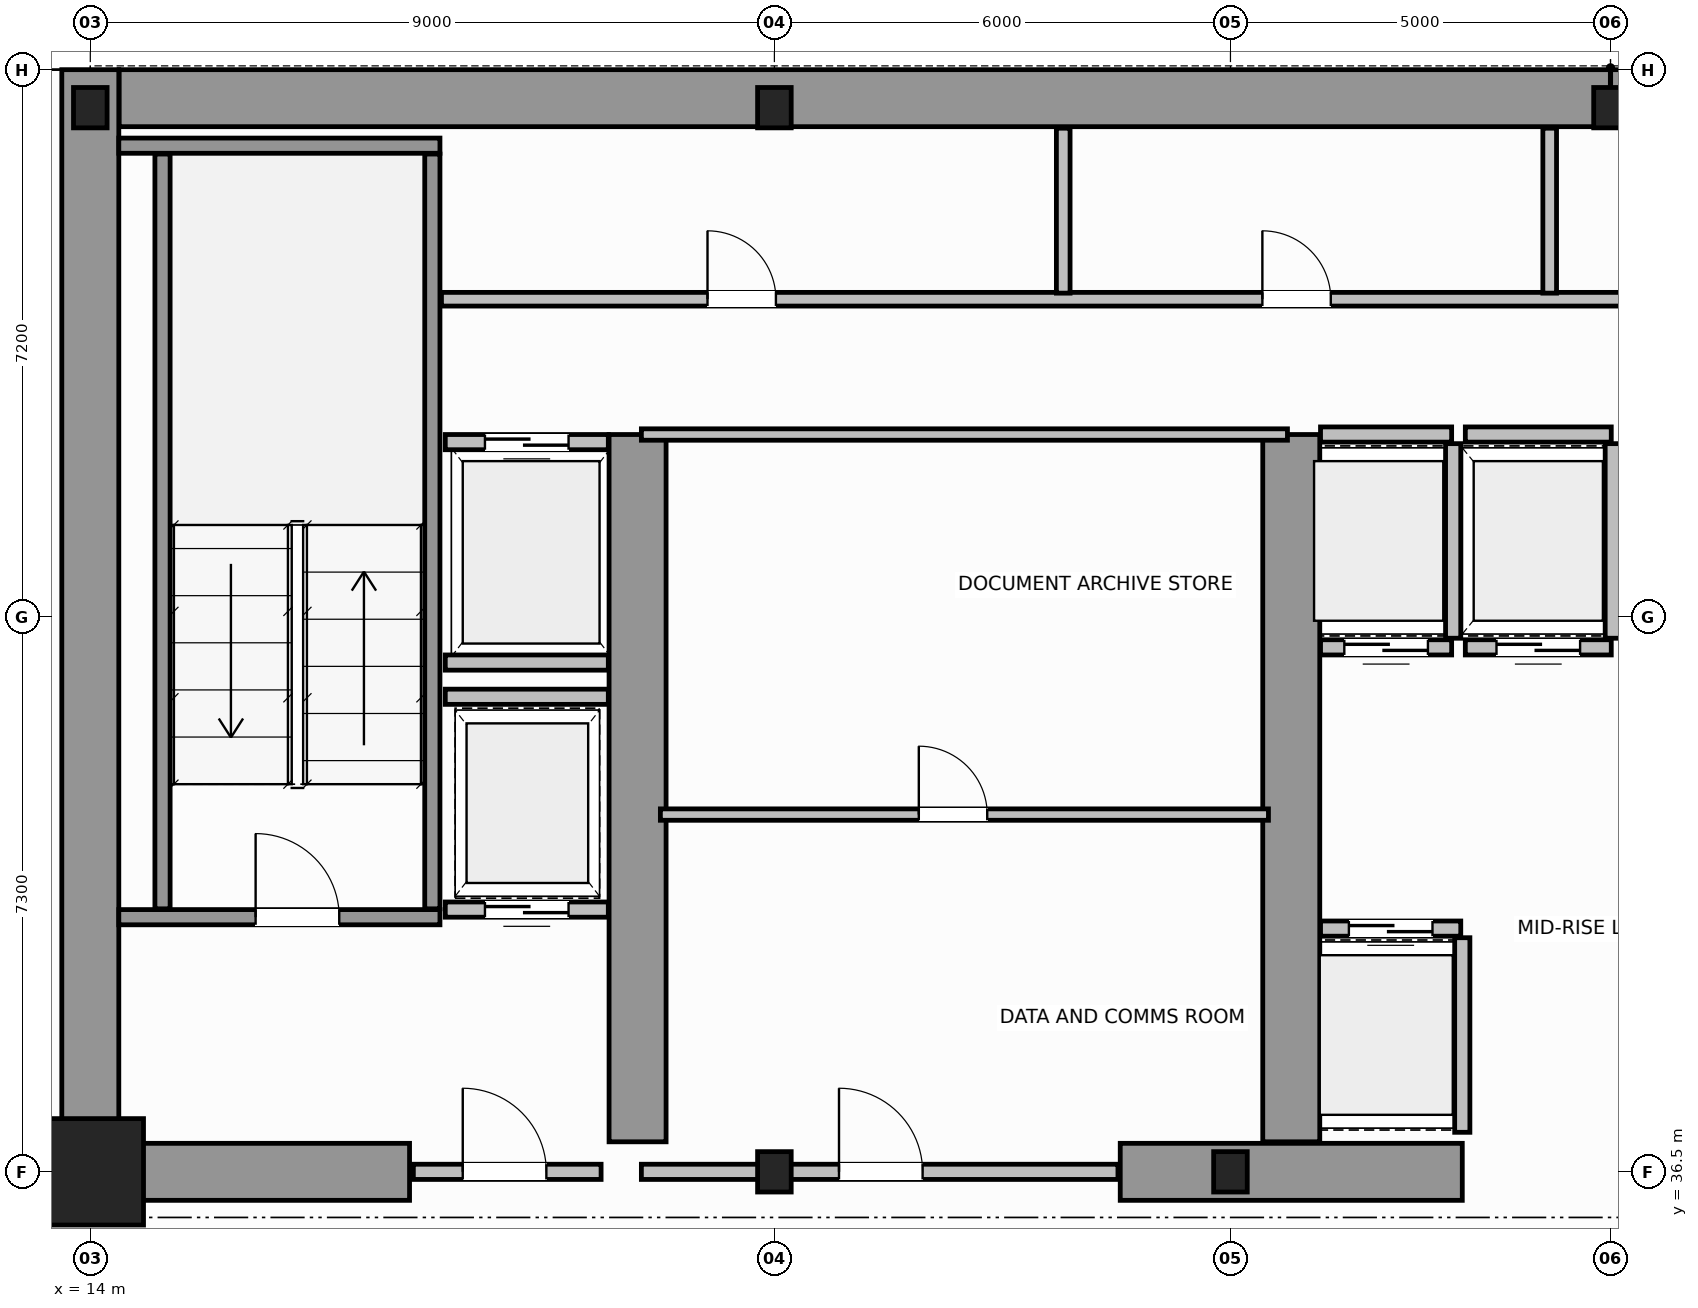
"""IFC4 building model, lengths in metres.
Left out: names, types, materials, properties, quantities, classifications, styles, units other than length and angle.
Written with IfcOpenShell. Run it as: python <this file> out.ifc"""

import sys

from ifc_helpers import new_model, si_unit, direction, frame, frame_2d, origin, origin_2d, place, context, subcontext, project, spatial, rectangle, i_section, extrude, source, transform, mapped, element, fill, save


model = new_model("IFC4")
c1 = context("Model", 3, precision=1e-05, world=origin(), true_north=direction((0.0, 1.0)))
c2 = subcontext(c1, "Body", "Model", "MODEL_VIEW")
j1 = project(units=[si_unit("LENGTHUNIT", "METRE"), si_unit("PLANEANGLEUNIT", "RADIAN")], contexts=[c1])
p1 = place(None, origin())
s1 = spatial("IfcSite", under=j1, at=p1, CompositionType="ELEMENT")
p2 = place(p1, origin())
s2 = spatial("IfcBuilding", under=s1, at=p2, CompositionType="ELEMENT")
p3 = place(p2, frame((0.0, 0.0, 118.6)))
s3 = spatial("IfcBuildingStorey", under=s2, at=p3, CompositionType="ELEMENT", Elevation=118.6)
m1 = source(origin(), c2, "Body", "SweptSolid", [
    extrude(rectangle(XDim=1.4, YDim=1.4, at=origin_2d()), origin(), (0.0, 0.0, 1.0), 3.8),
])
p4 = place(p3, frame((14.0, 36.5, 0.0), z_axis=(0.0, 0.0, 1.0), x_axis=(1.0, 0.0, 0.0)))
e1 = element("IfcColumn", 1, at=p4, inside=s3, PredefinedType="COLUMN", context=c2, shape_type="MappedRepresentation", body=[
    mapped(m1, transform((0.0, 0.0, 0.0), scale=1.0)),
])
m2 = source(origin(), c2, "Body", "SweptSolid", [
    extrude(i_section(OverallWidth=0.442, OverallDepth=0.531, WebThickness=0.065, FlangeThickness=0.076, FilletRadius=0.015, at=origin_2d()), origin(), (0.0, 0.0, 1.0), 3.8),
])
for number, where, z_axis, x_axis in (
    (2, (23.0, 36.5, 0.0), (0.0, 0.0, 1.0), (1.0, 0.0, 0.0)),
    (3, (29.0, 36.5, 0.0), (0.0, 0.0, 1.0), (1.0, 0.0, 0.0)),
    (4, (14.0, 50.5, 0.0), (0.0, 0.0, 1.0), (1.0, 0.0, 0.0)),
    (5, (23.0, 50.5, 0.0), (0.0, 0.0, 1.0), (1.0, 0.0, 0.0)),
    (6, (34.0, 50.5, 0.0), (0.0, 0.0, 1.0), (1.0, 0.0, 0.0)),
):
    element("IfcColumn", number, at=place(p3, frame(where, z_axis=z_axis, x_axis=x_axis)), inside=s3, PredefinedType="COLUMN", context=c2, shape_type="MappedRepresentation", body=[
        mapped(m2, transform((0.0, 0.0, 0.0), scale=1.0)),
    ])
for number, where, z_axis, x_axis in (
    (7, (14.379, 50.625, 0.0), (0.0, 0.0, 1.0), (1.0, 0.0, 0.0)),
    (8, (34.002, 50.625, 0.0), (0.0, 0.0, 1.0), (1.0, 0.0, 0.0)),
):
    element("IfcWall", number, at=place(p3, frame(where, z_axis=z_axis, x_axis=x_axis)), inside=s3, PredefinedType="SHEAR", context=c2, shape_type="SweptSolid", body=[
        extrude(rectangle(XDim=19.619, YDim=0.75, at=frame_2d((9.81, 0.0))), origin(), (0.0, 0.0, 1.0), 3.8),
    ])
p5 = place(p3, frame((14.0, 36.5, 0.0), z_axis=(0.0, 0.0, 1.0), x_axis=(0.0, 1.0, 0.0)))
e9 = element("IfcWall", 9, at=p5, inside=s3, PredefinedType="SHEAR", context=c2, shape_type="SweptSolid", body=[
    extrude(rectangle(XDim=14.5, YDim=0.75, at=frame_2d((7.25, 0.0))), origin(), (0.0, 0.0, 1.0), 3.8),
])
p6 = place(p3, frame((14.395, 36.5, 0.0), z_axis=(0.0, 0.0, 1.0), x_axis=(1.0, 0.0, 0.0)))
e10 = element("IfcWall", 10, at=p6, inside=s3, PredefinedType="SHEAR", context=c2, shape_type="SweptSolid", body=[
    extrude(rectangle(XDim=3.805, YDim=0.75, at=frame_2d((1.902, 0.0))), origin(), (0.0, 0.0, 1.0), 2.38),
])
p7 = place(p3, frame((27.55, 36.5, 0.0), z_axis=(0.0, 0.0, 1.0), x_axis=(1.0, 0.0, 0.0)))
e11 = element("IfcWall", 11, at=p7, inside=s3, PredefinedType="SHEAR", context=c2, shape_type="SweptSolid", body=[
    extrude(rectangle(XDim=4.5, YDim=0.75, at=frame_2d((2.25, 0.0))), origin(), (0.0, 0.0, 1.0), 3.8),
])
for number, where, z_axis, x_axis in (
    (12, (21.2, 36.895, 0.0), (0.0, 0.0, 1.0), (0.0, 1.0, 0.0)),
    (13, (29.8, 36.895, 0.0), (0.0, 0.0, 1.0), (0.0, 1.0, 0.0)),
):
    element("IfcWall", number, at=place(p3, frame(where, z_axis=z_axis, x_axis=x_axis)), inside=s3, PredefinedType="SHEAR", context=c2, shape_type="SweptSolid", body=[
        extrude(rectangle(XDim=9.305, YDim=0.75, at=frame_2d((4.652, 0.0))), origin(), (0.0, 0.0, 1.0), 3.8),
    ])
p8 = place(p3, frame((14.375, 39.85, 0.0), z_axis=(0.0, 0.0, 1.0), x_axis=(1.0, 0.0, 0.0)))
e14 = element("IfcWall", 14, at=p8, inside=s3, PredefinedType="SOLIDWALL", context=c2, shape_type="SweptSolid", body=[
    extrude(rectangle(XDim=4.225, YDim=0.2, at=frame_2d((2.113, 0.0))), origin(), (0.0, 0.0, 1.0), 3.8),
])
p9 = place(p8, frame((1.8, 0.0, 0.0)))
e15 = element("IfcOpeningElement", 15, at=p9, cuts=e14, PredefinedType="OPENING", context=c2, shape_type="SweptSolid", body=[
    extrude(rectangle(XDim=1.1, YDim=2.15, at=frame_2d((0.55, 1.075))), frame((0.0, 0.11, 0.0), z_axis=(0.0, -1.0, 0.0), x_axis=(1.0, 0.0, 0.0)), (0.0, 0.0, 1.0), 0.22),
])
p10 = place(p3, frame((14.375, 50.0, 0.0), z_axis=(0.0, 0.0, 1.0), x_axis=(1.0, 0.0, 0.0)))
e16 = element("IfcWall", 16, at=p10, inside=s3, PredefinedType="SOLIDWALL", context=c2, shape_type="SweptSolid", body=[
    extrude(rectangle(XDim=4.225, YDim=0.2, at=frame_2d((2.113, 0.0))), origin(), (0.0, 0.0, 1.0), 3.8),
])
for number, where, z_axis, x_axis in (
    (17, (14.95, 39.96, 0.0), (0.0, 0.0, 1.0), (0.0, 1.0, 0.0)),
    (18, (18.5, 39.96, 0.0), (0.0, 0.0, 1.0), (0.0, 1.0, 0.0)),
):
    element("IfcWall", number, at=place(p3, frame(where, z_axis=z_axis, x_axis=x_axis)), inside=s3, PredefinedType="SOLIDWALL", context=c2, shape_type="SweptSolid", body=[
        extrude(rectangle(XDim=9.93, YDim=0.2, at=frame_2d((4.965, 0.0))), origin(), (0.0, 0.0, 1.0), 3.8),
    ])
p11 = place(p3, frame((18.25, 36.5, 0.0), z_axis=(0.0, 0.0, 1.0), x_axis=(1.0, 0.0, 0.0)))
e19 = element("IfcWall", 19, at=p11, inside=s3, PredefinedType="SOLIDWALL", context=c2, shape_type="SweptSolid", body=[
    extrude(rectangle(XDim=2.47, YDim=0.2, at=frame_2d((1.235, 0.0))), origin(), (0.0, 0.0, 1.0), 2.37),
])
p12 = place(p11, frame((0.65, 0.0, 0.0)))
e20 = element("IfcOpeningElement", 20, at=p12, cuts=e19, PredefinedType="OPENING", context=c2, shape_type="SweptSolid", body=[
    extrude(rectangle(XDim=1.1, YDim=2.15, at=frame_2d((0.55, 1.075))), frame((0.0, 0.11, 0.0), z_axis=(0.0, -1.0, 0.0), x_axis=(1.0, 0.0, 0.0)), (0.0, 0.0, 1.0), 0.22),
])
p13 = place(p3, frame((30.185, 39.7, 0.0), z_axis=(0.0, 0.0, 1.0), x_axis=(1.0, 0.0, 0.0)))
e21 = element("IfcWall", 21, at=p13, inside=s3, PredefinedType="SOLIDWALL", context=c2, shape_type="SweptSolid", body=[
    extrude(rectangle(XDim=1.845, YDim=0.2, at=frame_2d((0.922, 0.0))), origin(), (0.0, 0.0, 1.0), 3.58),
])
p14 = place(p13, frame((0.373, 0.0, 0.0)))
e22 = element("IfcOpeningElement", 22, at=p14, cuts=e21, PredefinedType="OPENING", context=c2, shape_type="SweptSolid", body=[
    extrude(rectangle(XDim=1.1, YDim=2.15, at=frame_2d((0.55, 1.075))), frame((0.0, 0.11, 0.0), z_axis=(0.0, -1.0, 0.0), x_axis=(1.0, 0.0, 0.0)), (0.0, 0.0, 1.0), 0.22),
])
p15 = place(p3, frame((32.05, 37.02, 0.0), z_axis=(0.0, 0.0, 1.0), x_axis=(0.0, 1.0, 0.0)))
e23 = element("IfcWall", 23, at=p15, inside=s3, PredefinedType="SOLIDWALL", context=c2, shape_type="SweptSolid", body=[
    extrude(rectangle(XDim=2.56, YDim=0.2, at=frame_2d((1.28, 0.0))), origin(), (0.0, 0.0, 1.0), 3.58),
])
p16 = place(p3, frame((30.185, 43.4, 0.0), z_axis=(0.0, 0.0, 1.0), x_axis=(1.0, 0.0, 0.0)))
e24 = element("IfcWall", 24, at=p16, inside=s3, PredefinedType="SOLIDWALL", context=c2, shape_type="SweptSolid", body=[
    extrude(rectangle(XDim=1.725, YDim=0.2, at=frame_2d((0.862, 0.0))), origin(), (0.0, 0.0, 1.0), 3.58),
])
p17 = place(p16, frame((0.313, 0.0, 0.0)))
e25 = element("IfcOpeningElement", 25, at=p17, cuts=e24, PredefinedType="OPENING", context=c2, shape_type="SweptSolid", body=[
    extrude(rectangle(XDim=1.1, YDim=2.15, at=frame_2d((0.55, 1.075))), frame((0.0, 0.11, 0.0), z_axis=(0.0, -1.0, 0.0), x_axis=(1.0, 0.0, 0.0)), (0.0, 0.0, 1.0), 0.22),
])
p18 = place(p3, frame((30.185, 46.2, 0.0), z_axis=(0.0, 0.0, 1.0), x_axis=(1.0, 0.0, 0.0)))
e26 = element("IfcWall", 26, at=p18, inside=s3, PredefinedType="SOLIDWALL", context=c2, shape_type="SweptSolid", body=[
    extrude(rectangle(XDim=1.725, YDim=0.2, at=frame_2d((0.862, 0.0))), origin(), (0.0, 0.0, 1.0), 3.58),
])
p19 = place(p3, frame((31.93, 43.52, 0.0), z_axis=(0.0, 0.0, 1.0), x_axis=(0.0, 1.0, 0.0)))
e27 = element("IfcWall", 27, at=p19, inside=s3, PredefinedType="SOLIDWALL", context=c2, shape_type="SweptSolid", body=[
    extrude(rectangle(XDim=2.56, YDim=0.2, at=frame_2d((1.28, 0.0))), origin(), (0.0, 0.0, 1.0), 3.58),
])
p20 = place(p3, frame((32.09, 43.4, 0.0), z_axis=(0.0, 0.0, 1.0), x_axis=(1.0, 0.0, 0.0)))
e28 = element("IfcWall", 28, at=p20, inside=s3, PredefinedType="SOLIDWALL", context=c2, shape_type="SweptSolid", body=[
    extrude(rectangle(XDim=1.92, YDim=0.2, at=frame_2d((0.96, 0.0))), origin(), (0.0, 0.0, 1.0), 3.58),
])
p21 = place(p20, frame((0.41, 0.0, 0.0)))
e29 = element("IfcOpeningElement", 29, at=p21, cuts=e28, PredefinedType="OPENING", context=c2, shape_type="SweptSolid", body=[
    extrude(rectangle(XDim=1.1, YDim=2.15, at=frame_2d((0.55, 1.075))), frame((0.0, 0.11, 0.0), z_axis=(0.0, -1.0, 0.0), x_axis=(1.0, 0.0, 0.0)), (0.0, 0.0, 1.0), 0.22),
])
p22 = place(p3, frame((32.09, 46.2, 0.0), z_axis=(0.0, 0.0, 1.0), x_axis=(1.0, 0.0, 0.0)))
e30 = element("IfcWall", 30, at=p22, inside=s3, PredefinedType="SOLIDWALL", context=c2, shape_type="SweptSolid", body=[
    extrude(rectangle(XDim=1.92, YDim=0.2, at=frame_2d((0.96, 0.0))), origin(), (0.0, 0.0, 1.0), 3.58),
])
p23 = place(p3, frame((34.03, 43.52, 0.0), z_axis=(0.0, 0.0, 1.0), x_axis=(0.0, 1.0, 0.0)))
e31 = element("IfcWall", 31, at=p23, inside=s3, PredefinedType="SOLIDWALL", context=c2, shape_type="SweptSolid", body=[
    extrude(rectangle(XDim=2.56, YDim=0.2, at=frame_2d((1.28, 0.0))), origin(), (0.0, 0.0, 1.0), 3.58),
])
p24 = place(p3, frame((18.67, 46.1, 0.0), z_axis=(0.0, 0.0, 1.0), x_axis=(1.0, 0.0, 0.0)))
e32 = element("IfcWall", 32, at=p24, inside=s3, PredefinedType="SOLIDWALL", context=c2, shape_type="SweptSolid", body=[
    extrude(rectangle(XDim=2.145, YDim=0.2, at=frame_2d((1.073, 0.0))), origin(), (0.0, 0.0, 1.0), 3.58),
])
p25 = place(p24, frame((0.522, 0.0, 0.0)))
e33 = element("IfcOpeningElement", 33, at=p25, cuts=e32, PredefinedType="OPENING", context=c2, shape_type="SweptSolid", body=[
    extrude(rectangle(XDim=1.1, YDim=2.15, at=frame_2d((0.55, 1.075))), frame((0.0, 0.11, 0.0), z_axis=(0.0, -1.0, 0.0), x_axis=(1.0, 0.0, 0.0)), (0.0, 0.0, 1.0), 0.22),
])
p26 = place(p3, frame((18.67, 43.2, 0.0), z_axis=(0.0, 0.0, 1.0), x_axis=(1.0, 0.0, 0.0)))
e34 = element("IfcWall", 34, at=p26, inside=s3, PredefinedType="SOLIDWALL", context=c2, shape_type="SweptSolid", body=[
    extrude(rectangle(XDim=2.145, YDim=0.2, at=frame_2d((1.073, 0.0))), origin(), (0.0, 0.0, 1.0), 3.58),
])
p27 = place(p3, frame((18.67, 39.95, 0.0), z_axis=(0.0, 0.0, 1.0), x_axis=(1.0, 0.0, 0.0)))
e35 = element("IfcWall", 35, at=p27, inside=s3, PredefinedType="SOLIDWALL", context=c2, shape_type="SweptSolid", body=[
    extrude(rectangle(XDim=2.145, YDim=0.2, at=frame_2d((1.073, 0.0))), origin(), (0.0, 0.0, 1.0), 3.58),
])
p28 = place(p27, frame((0.522, 0.0, 0.0)))
e36 = element("IfcOpeningElement", 36, at=p28, cuts=e35, PredefinedType="OPENING", context=c2, shape_type="SweptSolid", body=[
    extrude(rectangle(XDim=1.1, YDim=2.15, at=frame_2d((0.55, 1.075))), frame((0.0, 0.11, 0.0), z_axis=(0.0, -1.0, 0.0), x_axis=(1.0, 0.0, 0.0)), (0.0, 0.0, 1.0), 0.22),
])
p29 = place(p3, frame((18.67, 42.75, 0.0), z_axis=(0.0, 0.0, 1.0), x_axis=(1.0, 0.0, 0.0)))
e37 = element("IfcWall", 37, at=p29, inside=s3, PredefinedType="SOLIDWALL", context=c2, shape_type="SweptSolid", body=[
    extrude(rectangle(XDim=2.145, YDim=0.2, at=frame_2d((1.073, 0.0))), origin(), (0.0, 0.0, 1.0), 3.58),
])
p30 = place(p3, frame((21.25, 36.5, 0.0), z_axis=(0.0, 0.0, 1.0), x_axis=(1.0, 0.0, 0.0)))
e38 = element("IfcWall", 38, at=p30, inside=s3, PredefinedType="SOLIDWALL", context=c2, shape_type="SweptSolid", body=[
    extrude(rectangle(XDim=6.27, YDim=0.2, at=frame_2d((3.135, 0.0))), origin(), (0.0, 0.0, 1.0), 2.37),
])
p31 = place(p30, frame((2.6, 0.0, 0.0)))
e39 = element("IfcOpeningElement", 39, at=p31, cuts=e38, PredefinedType="OPENING", context=c2, shape_type="SweptSolid", body=[
    extrude(rectangle(XDim=1.1, YDim=2.15, at=frame_2d((0.55, 1.075))), frame((0.0, 0.11, 0.0), z_axis=(0.0, -1.0, 0.0), x_axis=(1.0, 0.0, 0.0)), (0.0, 0.0, 1.0), 0.22),
])
p32 = place(p3, frame((21.25, 46.2, 0.0), z_axis=(0.0, 0.0, 1.0), x_axis=(1.0, 0.0, 0.0)))
e40 = element("IfcWall", 40, at=p32, inside=s3, PredefinedType="PARTITIONING", context=c2, shape_type="SweptSolid", body=[
    extrude(rectangle(XDim=8.5, YDim=0.15, at=frame_2d((4.25, 0.0))), origin(), (0.0, 0.0, 1.0), 3.58),
])
p33 = place(p3, frame((21.5, 41.2, 0.0), z_axis=(0.0, 0.0, 1.0), x_axis=(1.0, 0.0, 0.0)))
e41 = element("IfcWall", 41, at=p33, inside=s3, PredefinedType="PARTITIONING", context=c2, shape_type="SweptSolid", body=[
    extrude(rectangle(XDim=8.0, YDim=0.15, at=frame_2d((4.0, 0.0))), origin(), (0.0, 0.0, 1.0), 3.58),
])
p34 = place(p33, frame((3.4, 0.0, 0.0)))
e42 = element("IfcOpeningElement", 42, at=p34, cuts=e41, PredefinedType="OPENING", context=c2, shape_type="SweptSolid", body=[
    extrude(rectangle(XDim=0.9, YDim=2.1, at=frame_2d((0.45, 1.05))), frame((0.0, 0.085, 0.0), z_axis=(0.0, -1.0, 0.0), x_axis=(1.0, 0.0, 0.0)), (0.0, 0.0, 1.0), 0.17),
])
p35 = place(p3, frame((18.62, 47.98, 0.0), z_axis=(0.0, 0.0, 1.0), x_axis=(1.0, 0.0, 0.0)))
e43 = element("IfcWall", 43, at=p35, inside=s3, PredefinedType="PLUMBINGWALL", context=c2, shape_type="SweptSolid", body=[
    extrude(rectangle(XDim=20.06, YDim=0.18, at=frame_2d((10.03, 0.0))), origin(), (0.0, 0.0, 1.0), 3.58),
])
p36 = place(p35, frame((3.5, 0.0, 0.0)))
e44 = element("IfcOpeningElement", 44, at=p36, cuts=e43, PredefinedType="OPENING", context=c2, shape_type="SweptSolid", body=[
    extrude(rectangle(XDim=0.9, YDim=2.15, at=frame_2d((0.45, 1.075))), frame((0.0, 0.1, 0.0), z_axis=(0.0, -1.0, 0.0), x_axis=(1.0, 0.0, 0.0)), (0.0, 0.0, 1.0), 0.2),
])
p37 = place(p35, frame((10.8, 0.0, 0.0)))
e45 = element("IfcOpeningElement", 45, at=p37, cuts=e43, PredefinedType="OPENING", context=c2, shape_type="SweptSolid", body=[
    extrude(rectangle(XDim=0.9, YDim=2.15, at=frame_2d((0.45, 1.075))), frame((0.0, 0.1, 0.0), z_axis=(0.0, -1.0, 0.0), x_axis=(1.0, 0.0, 0.0)), (0.0, 0.0, 1.0), 0.2),
])
p38 = place(p35, frame((16.8, 0.0, 0.0)))
e46 = element("IfcOpeningElement", 46, at=p38, cuts=e43, PredefinedType="OPENING", context=c2, shape_type="SweptSolid", body=[
    extrude(rectangle(XDim=0.9, YDim=2.15, at=frame_2d((0.45, 1.075))), frame((0.0, 0.1, 0.0), z_axis=(0.0, -1.0, 0.0), x_axis=(1.0, 0.0, 0.0)), (0.0, 0.0, 1.0), 0.2),
])
for number, where, z_axis, x_axis in (
    (47, (26.8, 48.06, 0.0), (0.0, 0.0, 1.0), (0.0, 1.0, 0.0)),
    (48, (33.2, 48.06, 0.0), (0.0, 0.0, 1.0), (0.0, 1.0, 0.0)),
):
    element("IfcWall", number, at=place(p3, frame(where, z_axis=z_axis, x_axis=x_axis)), inside=s3, PredefinedType="PLUMBINGWALL", context=c2, shape_type="SweptSolid", body=[
        extrude(rectangle(XDim=2.17, YDim=0.18, at=frame_2d((1.085, 0.0))), origin(), (0.0, 0.0, 1.0), 3.58),
    ])
p39 = place(p3, frame((7.269, 36.48, 0.0), z_axis=(0.0, 0.0, 1.0), x_axis=(1.0, 0.0, 0.0)))
e49 = element("IfcWall", 49, at=p39, inside=s3, PredefinedType="PARTITIONING", context=c2, shape_type="SweptSolid", body=[
    extrude(rectangle(XDim=6.671, YDim=0.12, at=frame_2d((3.335, 0.0))), origin(), (0.0, 0.0, 1.0), 2.87),
])
p40 = place(p39, frame((2.885, 0.0, 0.0)))
e50 = element("IfcOpeningElement", 50, at=p40, cuts=e49, PredefinedType="OPENING", context=c2, shape_type="SweptSolid", body=[
    extrude(rectangle(XDim=0.9, YDim=2.15, at=frame_2d((0.45, 1.075))), frame((0.0, 0.07, 0.0), z_axis=(0.0, -1.0, 0.0), x_axis=(1.0, 0.0, 0.0)), (0.0, 0.0, 1.0), 0.14),
])
m3 = source(origin(), c2, "Body", "SweptSolid", [
    extrude(rectangle(XDim=1.1, YDim=2.15, at=frame_2d((0.55, 1.075))), frame((0.0, 0.025, 0.0), z_axis=(0.0, -1.0, 0.0), x_axis=(1.0, 0.0, 0.0)), (0.0, 0.0, 1.0), 0.05),
])
p41 = place(p9, origin())
e51 = element("IfcDoor", 51, at=p41, inside=s3, OperationType="SINGLE_SWING_LEFT", PredefinedType="DOOR", context=c2, shape_type="MappedRepresentation", body=[
    mapped(m3, transform((0.0, 0.0, 0.0), scale=1.0)),
])
fill(e15, e51)
p42 = place(p12, origin())
e52 = element("IfcDoor", 52, at=p42, inside=s3, OperationType="SINGLE_SWING_RIGHT", PredefinedType="DOOR", context=c2, shape_type="MappedRepresentation", body=[
    mapped(m3, transform((0.0, 0.0, 0.0), scale=1.0)),
])
fill(e20, e52)
p43 = place(p14, origin())
e53 = element("IfcDoor", 53, at=p43, inside=s3, OperationType="DOUBLE_DOOR_SLIDING", PredefinedType="DOOR", context=c2, shape_type="MappedRepresentation", body=[
    mapped(m3, transform((0.0, 0.0, 0.0), scale=1.0)),
])
fill(e22, e53)
p44 = place(p17, origin())
e54 = element("IfcDoor", 54, at=p44, inside=s3, OperationType="DOUBLE_DOOR_SLIDING", PredefinedType="DOOR", context=c2, shape_type="MappedRepresentation", body=[
    mapped(m3, transform((0.0, 0.0, 0.0), scale=1.0)),
])
fill(e25, e54)
p45 = place(p21, origin())
e55 = element("IfcDoor", 55, at=p45, inside=s3, OperationType="DOUBLE_DOOR_SLIDING", PredefinedType="DOOR", context=c2, shape_type="MappedRepresentation", body=[
    mapped(m3, transform((0.0, 0.0, 0.0), scale=1.0)),
])
fill(e29, e55)
p46 = place(p25, origin())
e56 = element("IfcDoor", 56, at=p46, inside=s3, OperationType="DOUBLE_DOOR_SLIDING", PredefinedType="DOOR", context=c2, shape_type="MappedRepresentation", body=[
    mapped(m3, transform((0.0, 0.0, 0.0), scale=1.0)),
])
fill(e33, e56)
p47 = place(p28, origin())
e57 = element("IfcDoor", 57, at=p47, inside=s3, OperationType="DOUBLE_DOOR_SLIDING", PredefinedType="DOOR", context=c2, shape_type="MappedRepresentation", body=[
    mapped(m3, transform((0.0, 0.0, 0.0), scale=1.0)),
])
fill(e36, e57)
p48 = place(p31, origin())
e58 = element("IfcDoor", 58, at=p48, inside=s3, OperationType="SINGLE_SWING_LEFT", PredefinedType="DOOR", context=c2, shape_type="MappedRepresentation", body=[
    mapped(m3, transform((0.0, 0.0, 0.0), scale=1.0)),
])
fill(e39, e58)
m4 = source(origin(), c2, "Body", "SweptSolid", [
    extrude(rectangle(XDim=0.9, YDim=2.1, at=frame_2d((0.45, 1.05))), frame((0.0, 0.025, 0.0), z_axis=(0.0, -1.0, 0.0), x_axis=(1.0, 0.0, 0.0)), (0.0, 0.0, 1.0), 0.05),
])
p49 = place(p34, origin())
e59 = element("IfcDoor", 59, at=p49, inside=s3, OperationType="SINGLE_SWING_RIGHT", PredefinedType="DOOR", context=c2, shape_type="MappedRepresentation", body=[
    mapped(m4, transform((0.0, 0.0, 0.0), scale=1.0)),
])
fill(e42, e59)
m5 = source(origin(), c2, "Body", "SweptSolid", [
    extrude(rectangle(XDim=0.9, YDim=2.15, at=frame_2d((0.45, 1.075))), frame((0.0, 0.025, 0.0), z_axis=(0.0, -1.0, 0.0), x_axis=(1.0, 0.0, 0.0)), (0.0, 0.0, 1.0), 0.05),
])
p50 = place(p36, origin())
e60 = element("IfcDoor", 60, at=p50, inside=s3, OperationType="SINGLE_SWING_LEFT", PredefinedType="DOOR", context=c2, shape_type="MappedRepresentation", body=[
    mapped(m5, transform((0.0, 0.0, 0.0), scale=1.0)),
])
fill(e44, e60)
p51 = place(p37, origin())
e61 = element("IfcDoor", 61, at=p51, inside=s3, OperationType="SINGLE_SWING_RIGHT", PredefinedType="DOOR", context=c2, shape_type="MappedRepresentation", body=[
    mapped(m5, transform((0.0, 0.0, 0.0), scale=1.0)),
])
fill(e45, e61)
save(model, sys.argv[1])
